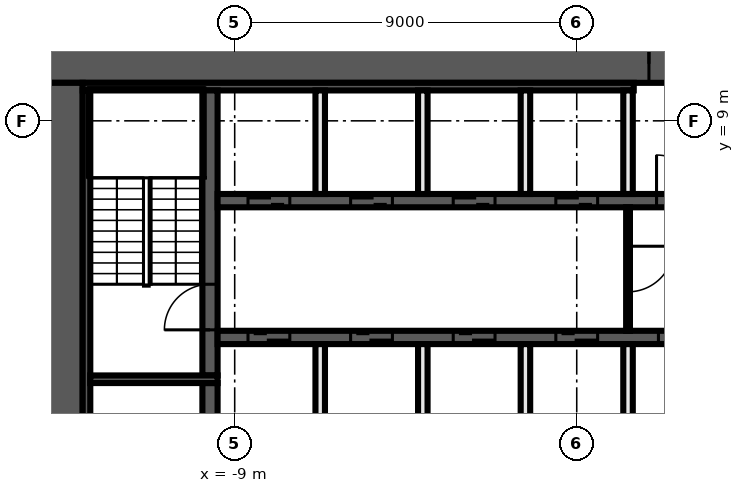
"""IFC4 building model, lengths in metres.
Left out: names, types, materials, properties, quantities, classifications, styles, units other than length and angle.
Written with IfcOpenShell. Run it as: python <this file> out.ifc"""

import sys

from ifc_helpers import new_model, si_unit, direction, frame, frame_2d, origin, place, context, subcontext, project, spatial, rectangle, extrude, element, fill, save


model = new_model("IFC4")
c1 = context("Model", 3, precision=1e-05, world=origin(), true_north=direction((0.0, 1.0)))
c2 = subcontext(c1, "Body", "Model", "MODEL_VIEW")
j1 = project(units=[si_unit("LENGTHUNIT", "METRE"), si_unit("PLANEANGLEUNIT", "RADIAN")], contexts=[c1])
p1 = place(None, origin())
s1 = spatial("IfcSite", under=j1, at=p1, CompositionType="ELEMENT")
p2 = place(p1, origin())
s2 = spatial("IfcBuilding", under=s1, at=p2, CompositionType="ELEMENT")
p3 = place(p2, frame((0.0, 0.0, 117.4)))
s3 = spatial("IfcBuildingStorey", under=s2, at=p3, CompositionType="ELEMENT", Elevation=117.4)
p4 = place(p3, frame((-14.0, 10.5, 0.0), z_axis=(0.0, 0.0, 1.0), x_axis=(1.0, 0.0, 0.0)))
e1 = element("IfcWall", 1, at=p4, inside=s3, PredefinedType="SHEAR", context=c2, shape_type="SweptSolid", body=[
    extrude(rectangle(XDim=28.0, YDim=1.0, at=frame_2d((14.0, 0.0))), origin(), (0.0, 0.0, 1.0), 3.3),
])
p5 = place(p4, frame((15.9, 0.0, 0.0)))
e2 = element("IfcOpeningElement", 2, at=p5, cuts=e1, PredefinedType="OPENING", context=c2, shape_type="SweptSolid", body=[
    extrude(rectangle(XDim=1.6, YDim=2.1, at=frame_2d((0.8, 1.05))), frame((0.0, 0.51, 0.0), z_axis=(0.0, -1.0, 0.0), x_axis=(1.0, 0.0, 0.0)), (0.0, 0.0, 1.0), 1.02),
])
p6 = place(p3, frame((-13.5, -10.0, 0.0), z_axis=(0.0, 0.0, 1.0), x_axis=(0.0, 1.0, 0.0)))
e3 = element("IfcWall", 3, at=p6, inside=s3, PredefinedType="SHEAR", context=c2, shape_type="SweptSolid", body=[
    extrude(rectangle(XDim=20.0, YDim=1.0, at=frame_2d((10.0, 0.0))), origin(), (0.0, 0.0, 1.0), 3.3),
])
p7 = place(p3, frame((-13.0, 9.9, 0.0), z_axis=(0.0, 0.0, 1.0), x_axis=(1.0, 0.0, 0.0)))
e4 = element("IfcWall", 4, at=p7, inside=s3, PredefinedType="SHEAR", context=c2, shape_type="SweptSolid", body=[
    extrude(rectangle(XDim=14.5, YDim=0.2, at=frame_2d((7.25, 0.0))), origin(), (0.0, 0.0, 1.0), 3.3),
])
p8 = place(p3, frame((-12.9, -9.8, 0.0), z_axis=(0.0, 0.0, 1.0), x_axis=(0.0, 1.0, 0.0)))
e5 = element("IfcWall", 5, at=p8, inside=s3, PredefinedType="SHEAR", context=c2, shape_type="SweptSolid", body=[
    extrude(rectangle(XDim=19.6, YDim=0.2, at=frame_2d((9.8, 0.0))), origin(), (0.0, 0.0, 1.0), 3.3),
])
p9 = place(p3, frame((-9.65, -2.1, 0.0), z_axis=(0.0, 0.0, 1.0), x_axis=(0.0, 1.0, 0.0)))
e6 = element("IfcWall", 6, at=p9, inside=s3, PredefinedType="SHEAR", context=c2, shape_type="SweptSolid", body=[
    extrude(rectangle(XDim=4.2, YDim=0.4, at=frame_2d((2.1, 0.0))), origin(), (0.0, 0.0, 1.0), 3.3),
])
p10 = place(p3, frame((-9.65, 2.3, 0.0), z_axis=(0.0, 0.0, 1.0), x_axis=(0.0, 1.0, 0.0)))
e7 = element("IfcWall", 7, at=p10, inside=s3, PredefinedType="SHEAR", context=c2, shape_type="SweptSolid", body=[
    extrude(rectangle(XDim=7.5, YDim=0.4, at=frame_2d((3.75, 0.0))), origin(), (0.0, 0.0, 1.0), 3.3),
])
p11 = place(p10, frame((1.2, 0.0, 0.0)))
e8 = element("IfcOpeningElement", 8, at=p11, cuts=e7, PredefinedType="OPENING", context=c2, shape_type="SweptSolid", body=[
    extrude(rectangle(XDim=1.2, YDim=2.1, at=frame_2d((0.6, 1.05))), frame((0.0, 0.21, 0.0), z_axis=(0.0, -1.0, 0.0), x_axis=(1.0, 0.0, 0.0)), (0.0, 0.0, 1.0), 0.42),
])
p12 = place(p3, frame((-9.45, 2.2, 0.0), z_axis=(0.0, 0.0, 1.0), x_axis=(-1.0, 0.0, 0.0)))
e9 = element("IfcWall", 9, at=p12, inside=s3, PredefinedType="SHEAR", context=c2, shape_type="SweptSolid", body=[
    extrude(rectangle(XDim=3.35, YDim=0.2, at=frame_2d((1.675, 0.0))), origin(), (0.0, 0.0, 1.0), 3.3),
])
p13 = place(p3, frame((-9.45, 6.9, 0.0), z_axis=(0.0, 0.0, 1.0), x_axis=(1.0, 0.0, 0.0)))
e10 = element("IfcWall", 10, at=p13, inside=s3, PredefinedType="SHEAR", context=c2, shape_type="SweptSolid", body=[
    extrude(rectangle(XDim=18.9, YDim=0.35, at=frame_2d((9.45, 0.0))), origin(), (0.0, 0.0, 1.0), 3.3),
])
p14 = place(p13, frame((0.8, 0.0, 0.0)))
e11 = element("IfcOpeningElement", 11, at=p14, cuts=e10, PredefinedType="OPENING", context=c2, shape_type="SweptSolid", body=[
    extrude(rectangle(XDim=1.1, YDim=2.1, at=frame_2d((0.55, 1.05))), frame((0.0, 0.185, 0.0), z_axis=(0.0, -1.0, 0.0), x_axis=(1.0, 0.0, 0.0)), (0.0, 0.0, 1.0), 0.37),
])
p15 = place(p13, frame((3.5, 0.0, 0.0)))
e12 = element("IfcOpeningElement", 12, at=p15, cuts=e10, PredefinedType="OPENING", context=c2, shape_type="SweptSolid", body=[
    extrude(rectangle(XDim=1.1, YDim=2.1, at=frame_2d((0.55, 1.05))), frame((0.0, 0.185, 0.0), z_axis=(0.0, -1.0, 0.0), x_axis=(1.0, 0.0, 0.0)), (0.0, 0.0, 1.0), 0.37),
])
p16 = place(p13, frame((6.2, 0.0, 0.0)))
e13 = element("IfcOpeningElement", 13, at=p16, cuts=e10, PredefinedType="OPENING", context=c2, shape_type="SweptSolid", body=[
    extrude(rectangle(XDim=1.1, YDim=2.1, at=frame_2d((0.55, 1.05))), frame((0.0, 0.185, 0.0), z_axis=(0.0, -1.0, 0.0), x_axis=(1.0, 0.0, 0.0)), (0.0, 0.0, 1.0), 0.37),
])
p17 = place(p13, frame((8.9, 0.0, 0.0)))
e14 = element("IfcOpeningElement", 14, at=p17, cuts=e10, PredefinedType="OPENING", context=c2, shape_type="SweptSolid", body=[
    extrude(rectangle(XDim=1.1, YDim=2.1, at=frame_2d((0.55, 1.05))), frame((0.0, 0.185, 0.0), z_axis=(0.0, -1.0, 0.0), x_axis=(1.0, 0.0, 0.0)), (0.0, 0.0, 1.0), 0.37),
])
p18 = place(p13, frame((11.55, 0.0, 0.0)))
e15 = element("IfcOpeningElement", 15, at=p18, cuts=e10, PredefinedType="OPENING", context=c2, shape_type="SweptSolid", body=[
    extrude(rectangle(XDim=1.2, YDim=2.1, at=frame_2d((0.6, 1.05))), frame((0.0, 0.185, 0.0), z_axis=(0.0, -1.0, 0.0), x_axis=(1.0, 0.0, 0.0)), (0.0, 0.0, 1.0), 0.37),
])
p19 = place(p13, frame((14.3, 0.0, 0.0)))
e16 = element("IfcOpeningElement", 16, at=p19, cuts=e10, PredefinedType="OPENING", context=c2, shape_type="SweptSolid", body=[
    extrude(rectangle(XDim=1.1, YDim=2.1, at=frame_2d((0.55, 1.05))), frame((0.0, 0.185, 0.0), z_axis=(0.0, -1.0, 0.0), x_axis=(1.0, 0.0, 0.0)), (0.0, 0.0, 1.0), 0.37),
])
p20 = place(p13, frame((17.0, 0.0, 0.0)))
e17 = element("IfcOpeningElement", 17, at=p20, cuts=e10, PredefinedType="OPENING", context=c2, shape_type="SweptSolid", body=[
    extrude(rectangle(XDim=1.1, YDim=2.1, at=frame_2d((0.55, 1.05))), frame((0.0, 0.185, 0.0), z_axis=(0.0, -1.0, 0.0), x_axis=(1.0, 0.0, 0.0)), (0.0, 0.0, 1.0), 0.37),
])
p21 = place(p3, frame((9.45, 3.3, 0.0), z_axis=(0.0, 0.0, 1.0), x_axis=(-1.0, 0.0, 0.0)))
e18 = element("IfcWall", 18, at=p21, inside=s3, PredefinedType="SHEAR", context=c2, shape_type="SweptSolid", body=[
    extrude(rectangle(XDim=18.9, YDim=0.35, at=frame_2d((9.45, 0.0))), origin(), (0.0, 0.0, 1.0), 3.3),
])
p22 = place(p21, frame((17.0, 0.0, 0.0)))
e19 = element("IfcOpeningElement", 19, at=p22, cuts=e18, PredefinedType="OPENING", context=c2, shape_type="SweptSolid", body=[
    extrude(rectangle(XDim=1.1, YDim=2.1, at=frame_2d((0.55, 1.05))), frame((0.0, 0.185, 0.0), z_axis=(0.0, -1.0, 0.0), x_axis=(1.0, 0.0, 0.0)), (0.0, 0.0, 1.0), 0.37),
])
p23 = place(p21, frame((14.3, 0.0, 0.0)))
e20 = element("IfcOpeningElement", 20, at=p23, cuts=e18, PredefinedType="OPENING", context=c2, shape_type="SweptSolid", body=[
    extrude(rectangle(XDim=1.1, YDim=2.1, at=frame_2d((0.55, 1.05))), frame((0.0, 0.185, 0.0), z_axis=(0.0, -1.0, 0.0), x_axis=(1.0, 0.0, 0.0)), (0.0, 0.0, 1.0), 0.37),
])
p24 = place(p21, frame((11.6, 0.0, 0.0)))
e21 = element("IfcOpeningElement", 21, at=p24, cuts=e18, PredefinedType="OPENING", context=c2, shape_type="SweptSolid", body=[
    extrude(rectangle(XDim=1.1, YDim=2.1, at=frame_2d((0.55, 1.05))), frame((0.0, 0.185, 0.0), z_axis=(0.0, -1.0, 0.0), x_axis=(1.0, 0.0, 0.0)), (0.0, 0.0, 1.0), 0.37),
])
p25 = place(p21, frame((8.9, 0.0, 0.0)))
e22 = element("IfcOpeningElement", 22, at=p25, cuts=e18, PredefinedType="OPENING", context=c2, shape_type="SweptSolid", body=[
    extrude(rectangle(XDim=1.1, YDim=2.1, at=frame_2d((0.55, 1.05))), frame((0.0, 0.185, 0.0), z_axis=(0.0, -1.0, 0.0), x_axis=(1.0, 0.0, 0.0)), (0.0, 0.0, 1.0), 0.37),
])
p26 = place(p21, frame((6.2, 0.0, 0.0)))
e23 = element("IfcOpeningElement", 23, at=p26, cuts=e18, PredefinedType="OPENING", context=c2, shape_type="SweptSolid", body=[
    extrude(rectangle(XDim=1.1, YDim=2.1, at=frame_2d((0.55, 1.05))), frame((0.0, 0.185, 0.0), z_axis=(0.0, -1.0, 0.0), x_axis=(1.0, 0.0, 0.0)), (0.0, 0.0, 1.0), 0.37),
])
p27 = place(p21, frame((3.5, 0.0, 0.0)))
e24 = element("IfcOpeningElement", 24, at=p27, cuts=e18, PredefinedType="OPENING", context=c2, shape_type="SweptSolid", body=[
    extrude(rectangle(XDim=1.1, YDim=2.1, at=frame_2d((0.55, 1.05))), frame((0.0, 0.185, 0.0), z_axis=(0.0, -1.0, 0.0), x_axis=(1.0, 0.0, 0.0)), (0.0, 0.0, 1.0), 0.37),
])
p28 = place(p21, frame((0.9, 0.0, 0.0)))
e25 = element("IfcOpeningElement", 25, at=p28, cuts=e18, PredefinedType="OPENING", context=c2, shape_type="SweptSolid", body=[
    extrude(rectangle(XDim=0.9, YDim=2.1, at=frame_2d((0.45, 1.05))), frame((0.0, 0.185, 0.0), z_axis=(0.0, -1.0, 0.0), x_axis=(1.0, 0.0, 0.0)), (0.0, 0.0, 1.0), 0.37),
])
p29 = place(p3, frame((1.35, 6.725, 0.0), z_axis=(0.0, 0.0, 1.0), x_axis=(0.0, -1.0, 0.0)))
e26 = element("IfcWall", 26, at=p29, inside=s3, PredefinedType="PARTITIONING", context=c2, shape_type="SweptSolid", body=[
    extrude(rectangle(XDim=3.25, YDim=0.1, at=frame_2d((1.625, 0.0))), origin(), (0.0, 0.0, 1.0), 3.3),
])
p30 = place(p29, frame((1.025, 0.0, 0.0)))
e27 = element("IfcOpeningElement", 27, at=p30, cuts=e26, PredefinedType="OPENING", context=c2, shape_type="SweptSolid", body=[
    extrude(rectangle(XDim=1.2, YDim=2.1, at=frame_2d((0.6, 1.05))), frame((0.0, 0.06, 0.0), z_axis=(0.0, -1.0, 0.0), x_axis=(1.0, 0.0, 0.0)), (0.0, 0.0, 1.0), 0.12),
])
for number, where, z_axis, x_axis in (
    (28, (1.35, 0.4, 0.0), (0.0, 0.0, 1.0), (0.0, 1.0, 0.0)),
    (29, (1.35, 7.075, 0.0), (0.0, 0.0, 1.0), (0.0, 1.0, 0.0)),
    (30, (-1.35, 0.4, 0.0), (0.0, 0.0, 1.0), (0.0, 1.0, 0.0)),
    (31, (-1.35, 7.075, 0.0), (0.0, 0.0, 1.0), (0.0, 1.0, 0.0)),
    (32, (-4.05, 0.4, 0.0), (0.0, 0.0, 1.0), (0.0, 1.0, 0.0)),
    (33, (-4.05, 7.075, 0.0), (0.0, 0.0, 1.0), (0.0, 1.0, 0.0)),
    (34, (-6.75, 0.4, 0.0), (0.0, 0.0, 1.0), (0.0, 1.0, 0.0)),
    (35, (-6.75, 7.075, 0.0), (0.0, 0.0, 1.0), (0.0, 1.0, 0.0)),
):
    element("IfcWall", number, at=place(p3, frame(where, z_axis=z_axis, x_axis=x_axis)), inside=s3, PredefinedType="SOLIDWALL", context=c2, shape_type="SweptSolid", body=[
        extrude(rectangle(XDim=2.725, YDim=0.25, at=frame_2d((1.363, 0.0))), origin(), (0.0, 0.0, 1.0), 3.3),
    ])
p31 = place(p14, origin())
e36 = element("IfcDoor", 36, at=p31, inside=s3, OperationType="DOUBLE_DOOR_SLIDING", PredefinedType="DOOR", context=c2, shape_type="SweptSolid", body=[
    extrude(rectangle(XDim=1.1, YDim=2.1, at=frame_2d((0.55, 1.05))), frame((0.0, 0.025, 0.0), z_axis=(0.0, -1.0, 0.0), x_axis=(1.0, 0.0, 0.0)), (0.0, 0.0, 1.0), 0.05),
])
fill(e11, e36)
p32 = place(p15, origin())
e37 = element("IfcDoor", 37, at=p32, inside=s3, OperationType="DOUBLE_DOOR_SLIDING", PredefinedType="DOOR", context=c2, shape_type="SweptSolid", body=[
    extrude(rectangle(XDim=1.1, YDim=2.1, at=frame_2d((0.55, 1.05))), frame((0.0, 0.025, 0.0), z_axis=(0.0, -1.0, 0.0), x_axis=(1.0, 0.0, 0.0)), (0.0, 0.0, 1.0), 0.05),
])
fill(e12, e37)
p33 = place(p16, origin())
e38 = element("IfcDoor", 38, at=p33, inside=s3, OperationType="DOUBLE_DOOR_SLIDING", PredefinedType="DOOR", context=c2, shape_type="SweptSolid", body=[
    extrude(rectangle(XDim=1.1, YDim=2.1, at=frame_2d((0.55, 1.05))), frame((0.0, 0.025, 0.0), z_axis=(0.0, -1.0, 0.0), x_axis=(1.0, 0.0, 0.0)), (0.0, 0.0, 1.0), 0.05),
])
fill(e13, e38)
p34 = place(p17, origin())
e39 = element("IfcDoor", 39, at=p34, inside=s3, OperationType="DOUBLE_DOOR_SLIDING", PredefinedType="DOOR", context=c2, shape_type="SweptSolid", body=[
    extrude(rectangle(XDim=1.1, YDim=2.1, at=frame_2d((0.55, 1.05))), frame((0.0, 0.025, 0.0), z_axis=(0.0, -1.0, 0.0), x_axis=(1.0, 0.0, 0.0)), (0.0, 0.0, 1.0), 0.05),
])
fill(e14, e39)
p35 = place(p5, origin())
e40 = element("IfcDoor", 40, at=p35, inside=s3, OperationType="DOUBLE_DOOR_SINGLE_SWING", PredefinedType="DOOR", context=c2, shape_type="SweptSolid", body=[
    extrude(rectangle(XDim=1.6, YDim=2.1, at=frame_2d((0.8, 1.05))), frame((0.0, 0.025, 0.0), z_axis=(0.0, -1.0, 0.0), x_axis=(1.0, 0.0, 0.0)), (0.0, 0.0, 1.0), 0.05),
])
fill(e2, e40)
p36 = place(p18, origin())
e41 = element("IfcDoor", 41, at=p36, inside=s3, OperationType="SINGLE_SWING_LEFT", PredefinedType="DOOR", context=c2, shape_type="SweptSolid", body=[
    extrude(rectangle(XDim=1.2, YDim=2.1, at=frame_2d((0.6, 1.05))), frame((0.0, 0.025, 0.0), z_axis=(0.0, -1.0, 0.0), x_axis=(1.0, 0.0, 0.0)), (0.0, 0.0, 1.0), 0.05),
])
fill(e15, e41)
p37 = place(p22, origin())
e42 = element("IfcDoor", 42, at=p37, inside=s3, OperationType="DOUBLE_DOOR_SLIDING", PredefinedType="DOOR", context=c2, shape_type="SweptSolid", body=[
    extrude(rectangle(XDim=1.1, YDim=2.1, at=frame_2d((0.55, 1.05))), frame((0.0, 0.025, 0.0), z_axis=(0.0, -1.0, 0.0), x_axis=(1.0, 0.0, 0.0)), (0.0, 0.0, 1.0), 0.05),
])
fill(e19, e42)
p38 = place(p23, origin())
e43 = element("IfcDoor", 43, at=p38, inside=s3, OperationType="DOUBLE_DOOR_SLIDING", PredefinedType="DOOR", context=c2, shape_type="SweptSolid", body=[
    extrude(rectangle(XDim=1.1, YDim=2.1, at=frame_2d((0.55, 1.05))), frame((0.0, 0.025, 0.0), z_axis=(0.0, -1.0, 0.0), x_axis=(1.0, 0.0, 0.0)), (0.0, 0.0, 1.0), 0.05),
])
fill(e20, e43)
p39 = place(p24, origin())
e44 = element("IfcDoor", 44, at=p39, inside=s3, OperationType="DOUBLE_DOOR_SLIDING", PredefinedType="DOOR", context=c2, shape_type="SweptSolid", body=[
    extrude(rectangle(XDim=1.1, YDim=2.1, at=frame_2d((0.55, 1.05))), frame((0.0, 0.025, 0.0), z_axis=(0.0, -1.0, 0.0), x_axis=(1.0, 0.0, 0.0)), (0.0, 0.0, 1.0), 0.05),
])
fill(e21, e44)
p40 = place(p25, origin())
e45 = element("IfcDoor", 45, at=p40, inside=s3, OperationType="DOUBLE_DOOR_SLIDING", PredefinedType="DOOR", context=c2, shape_type="SweptSolid", body=[
    extrude(rectangle(XDim=1.1, YDim=2.1, at=frame_2d((0.55, 1.05))), frame((0.0, 0.025, 0.0), z_axis=(0.0, -1.0, 0.0), x_axis=(1.0, 0.0, 0.0)), (0.0, 0.0, 1.0), 0.05),
])
fill(e22, e45)
p41 = place(p26, origin())
e46 = element("IfcDoor", 46, at=p41, inside=s3, OperationType="DOUBLE_DOOR_SLIDING", PredefinedType="DOOR", context=c2, shape_type="SweptSolid", body=[
    extrude(rectangle(XDim=1.1, YDim=2.1, at=frame_2d((0.55, 1.05))), frame((0.0, 0.025, 0.0), z_axis=(0.0, -1.0, 0.0), x_axis=(1.0, 0.0, 0.0)), (0.0, 0.0, 1.0), 0.05),
])
fill(e23, e46)
p42 = place(p11, origin())
e47 = element("IfcDoor", 47, at=p42, inside=s3, OperationType="SINGLE_SWING_RIGHT", PredefinedType="DOOR", context=c2, shape_type="SweptSolid", body=[
    extrude(rectangle(XDim=1.2, YDim=2.1, at=frame_2d((0.6, 1.05))), frame((0.0, 0.025, 0.0), z_axis=(0.0, -1.0, 0.0), x_axis=(1.0, 0.0, 0.0)), (0.0, 0.0, 1.0), 0.05),
])
fill(e8, e47)
p43 = place(p30, origin())
e48 = element("IfcDoor", 48, at=p43, inside=s3, OperationType="SINGLE_SWING_LEFT", PredefinedType="DOOR", context=c2, shape_type="SweptSolid", body=[
    extrude(rectangle(XDim=1.2, YDim=2.1, at=frame_2d((0.6, 1.05))), frame((0.0, 0.025, 0.0), z_axis=(0.0, -1.0, 0.0), x_axis=(1.0, 0.0, 0.0)), (0.0, 0.0, 1.0), 0.05),
])
fill(e27, e48)
save(model, sys.argv[1])
